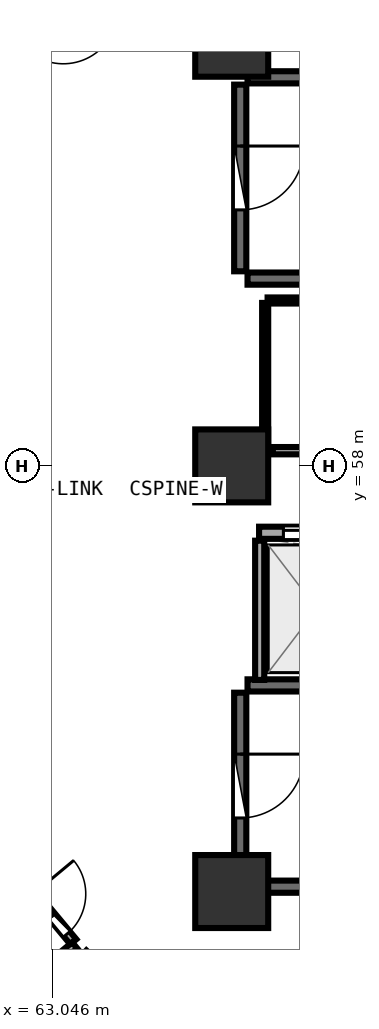
"""IFC4 building model, lengths in metres.
Left out: names, types, materials, properties, quantities, classifications, styles, units other than length and angle.
Written with IfcOpenShell. Run it as: python <this file> out.ifc"""

import sys

from ifc_helpers import new_model, si_unit, direction, frame, frame_2d, origin, origin_2d, place, context, subcontext, project, spatial, rectangle, extrude, element, fill, save


model = new_model("IFC4")
c1 = context("Model", 3, precision=1e-05, world=origin(), true_north=direction((0.0, 1.0)))
c2 = subcontext(c1, "Body", "Model", "MODEL_VIEW")
j1 = project(units=[si_unit("LENGTHUNIT", "METRE"), si_unit("PLANEANGLEUNIT", "RADIAN")], contexts=[c1])
p1 = place(None, origin())
s1 = spatial("IfcSite", under=j1, at=p1, CompositionType="ELEMENT")
p2 = place(p1, origin())
s2 = spatial("IfcBuilding", under=s1, at=p2, CompositionType="ELEMENT")
p3 = place(p2, frame((0.0, 0.0, 196.95)))
s3 = spatial("IfcBuildingStorey", under=s2, at=p3, CompositionType="ELEMENT", Elevation=196.95)
for number, where, z_axis, x_axis in (
    (1, (66.0, 51.0, 0.0), (0.0, 0.0, 1.0), (1.0, 0.0, 0.0)),
    (2, (66.0, 65.0, 0.0), (0.0, 0.0, 1.0), (1.0, 0.0, 0.0)),
    (3, (66.0, 58.0, 0.0), (0.0, 0.0, 1.0), (1.0, 0.0, 0.0)),
):
    element("IfcColumn", number, at=place(p3, frame(where, z_axis=z_axis, x_axis=x_axis)), inside=s3, PredefinedType="PILASTER", context=c2, shape_type="SweptSolid", body=[
        extrude(rectangle(XDim=1.2, YDim=1.2, at=origin_2d()), origin(), (0.0, 0.0, 1.0), 3.75),
    ])
for number, where, z_axis, x_axis in (
    (4, (66.26, 61.08, 0.0), (0.0, 0.0, 1.0), (1.0, 0.0, 0.0)),
    (5, (73.42, 64.39, 0.0), (0.0, 0.0, 1.0), (-1.0, 0.0, 0.0)),
):
    element("IfcWall", number, at=place(p3, frame(where, z_axis=z_axis, x_axis=x_axis)), inside=s3, PredefinedType="SHEAR", context=c2, shape_type="SweptSolid", body=[
        extrude(rectangle(XDim=7.16, YDim=0.2, at=frame_2d((3.58, 0.0))), origin(), (0.0, 0.0, 1.0), 3.49),
    ])
p4 = place(p3, frame((66.14, 64.27, 0.0), z_axis=(0.0, 0.0, 1.0), x_axis=(0.0, -1.0, 0.0)))
e6 = element("IfcWall", 6, at=p4, inside=s3, PredefinedType="SHEAR", context=c2, shape_type="SweptSolid", body=[
    extrude(rectangle(XDim=3.07, YDim=0.2, at=frame_2d((1.535, 0.0))), origin(), (0.0, 0.0, 1.0), 3.49),
])
p5 = place(p4, frame((1.01, 0.0, 0.0)))
e7 = element("IfcOpeningElement", 7, at=p5, cuts=e6, PredefinedType="OPENING", context=c2, shape_type="SweptSolid", body=[
    extrude(rectangle(XDim=1.05, YDim=2.1, at=frame_2d((0.525, 1.05))), frame((0.0, 0.11, 0.0), z_axis=(0.0, -1.0, 0.0), x_axis=(1.0, 0.0, 0.0)), (0.0, 0.0, 1.0), 0.22),
])
for number, where, z_axis, x_axis in (
    (8, (66.26, 51.08, 0.0), (0.0, 0.0, 1.0), (1.0, 0.0, 0.0)),
    (9, (73.42, 54.39, 0.0), (0.0, 0.0, 1.0), (-1.0, 0.0, 0.0)),
):
    element("IfcWall", number, at=place(p3, frame(where, z_axis=z_axis, x_axis=x_axis)), inside=s3, PredefinedType="SHEAR", context=c2, shape_type="SweptSolid", body=[
        extrude(rectangle(XDim=7.16, YDim=0.2, at=frame_2d((3.58, 0.0))), origin(), (0.0, 0.0, 1.0), 3.49),
    ])
p6 = place(p3, frame((66.14, 54.27, 0.0), z_axis=(0.0, 0.0, 1.0), x_axis=(0.0, -1.0, 0.0)))
e10 = element("IfcWall", 10, at=p6, inside=s3, PredefinedType="SHEAR", context=c2, shape_type="SweptSolid", body=[
    extrude(rectangle(XDim=3.07, YDim=0.2, at=frame_2d((1.535, 0.0))), origin(), (0.0, 0.0, 1.0), 3.49),
])
p7 = place(p6, frame((1.01, 0.0, 0.0)))
e11 = element("IfcOpeningElement", 11, at=p7, cuts=e10, PredefinedType="OPENING", context=c2, shape_type="SweptSolid", body=[
    extrude(rectangle(XDim=1.05, YDim=2.1, at=frame_2d((0.525, 1.05))), frame((0.0, 0.11, 0.0), z_axis=(0.0, -1.0, 0.0), x_axis=(1.0, 0.0, 0.0)), (0.0, 0.0, 1.0), 0.22),
])
p8 = place(p3, frame((66.45, 56.9, 0.0), z_axis=(0.0, 0.0, 1.0), x_axis=(1.0, 0.0, 0.0)))
e12 = element("IfcWall", 12, at=p8, inside=s3, PredefinedType="SOLIDWALL", context=c2, shape_type="SweptSolid", body=[
    extrude(rectangle(XDim=14.4, YDim=0.2, at=frame_2d((7.2, 0.0))), origin(), (0.0, 0.0, 1.0), 3.48),
])
p9 = place(p8, frame((0.4, 0.0, 0.0)))
e13 = element("IfcOpeningElement", 13, at=p9, cuts=e12, PredefinedType="OPENING", context=c2, shape_type="SweptSolid", body=[
    extrude(rectangle(XDim=1.1, YDim=2.1, at=frame_2d((0.55, 1.05))), frame((0.0, 0.11, 0.0), z_axis=(0.0, -1.0, 0.0), x_axis=(1.0, 0.0, 0.0)), (0.0, 0.0, 1.0), 0.22),
])
p10 = place(p8, frame((2.4, 0.0, 0.0)))
e14 = element("IfcOpeningElement", 14, at=p10, cuts=e12, PredefinedType="OPENING", context=c2, shape_type="SweptSolid", body=[
    extrude(rectangle(XDim=1.1, YDim=2.1, at=frame_2d((0.55, 1.05))), frame((0.0, 0.11, 0.0), z_axis=(0.0, -1.0, 0.0), x_axis=(1.0, 0.0, 0.0)), (0.0, 0.0, 1.0), 0.22),
])
p11 = place(p8, frame((4.4, 0.0, 0.0)))
e15 = element("IfcOpeningElement", 15, at=p11, cuts=e12, PredefinedType="OPENING", context=c2, shape_type="SweptSolid", body=[
    extrude(rectangle(XDim=1.1, YDim=2.1, at=frame_2d((0.55, 1.05))), frame((0.0, 0.11, 0.0), z_axis=(0.0, -1.0, 0.0), x_axis=(1.0, 0.0, 0.0)), (0.0, 0.0, 1.0), 0.22),
])
p12 = place(p3, frame((66.46, 54.48, 0.0), z_axis=(0.0, 0.0, 1.0), x_axis=(0.0, 1.0, 0.0)))
e16 = element("IfcWall", 16, at=p12, inside=s3, PredefinedType="PARTITIONING", context=c2, shape_type="SweptSolid", body=[
    extrude(rectangle(XDim=2.29, YDim=0.15, at=frame_2d((1.145, 0.0))), origin(), (0.0, 0.0, 1.0), 3.48),
])
p13 = place(p3, frame((66.675, 58.25, 0.0), z_axis=(0.0, 0.0, 1.0), x_axis=(1.0, 0.0, 0.0)))
e17 = element("IfcWall", 17, at=p13, inside=s3, PredefinedType="PARTITIONING", context=c2, shape_type="SweptSolid", body=[
    extrude(rectangle(XDim=3.265, YDim=0.12, at=frame_2d((1.632, 0.0))), origin(), (0.0, 0.0, 1.0), 3.48),
])
p14 = place(p13, frame((1.182, 0.0, 0.0)))
e18 = element("IfcOpeningElement", 18, at=p14, cuts=e17, PredefinedType="OPENING", context=c2, shape_type="SweptSolid", body=[
    extrude(rectangle(XDim=0.9, YDim=2.08, at=frame_2d((0.45, 1.04))), frame((0.0, 0.07, 0.0), z_axis=(0.0, -1.0, 0.0), x_axis=(1.0, 0.0, 0.0)), (0.0, 0.0, 1.0), 0.14),
])
p15 = place(p3, frame((63.885, 66.327, 0.0), z_axis=(0.0, 0.0, 1.0), x_axis=(-0.626276824741, -0.779600756023, 0.0)))
e19 = element("IfcWall", 19, at=p15, inside=s3, PredefinedType="PARTITIONING", context=c2, shape_type="SweptSolid", body=[
    extrude(rectangle(XDim=2.99, YDim=0.12, at=frame_2d((1.495, 0.0))), origin(), (0.0, 0.0, 1.0), 3.025),
])
p16 = place(p15, frame((1.045, 0.0, 0.0)))
e20 = element("IfcOpeningElement", 20, at=p16, cuts=e19, PredefinedType="OPENING", context=c2, shape_type="SweptSolid", body=[
    extrude(rectangle(XDim=0.9, YDim=2.08, at=frame_2d((0.45, 1.04))), frame((0.0, 0.07, 0.0), z_axis=(0.0, -1.0, 0.0), x_axis=(1.0, 0.0, 0.0)), (0.0, 0.0, 1.0), 0.14),
])
p17 = place(p3, frame((62.635, 51.086, 0.0), z_axis=(0.0, 0.0, 1.0), x_axis=(0.639759255057, -0.768575367526, 0.0)))
e21 = element("IfcWall", 21, at=p17, inside=s3, PredefinedType="PLUMBINGWALL", context=c2, shape_type="SweptSolid", body=[
    extrude(rectangle(XDim=1.187, YDim=0.13, at=frame_2d((0.593, 0.0))), origin(), (0.0, 0.0, 1.0), 3.025),
])
p18 = place(p17, frame((0.163, 0.0, 0.0)))
e22 = element("IfcOpeningElement", 22, at=p18, cuts=e21, PredefinedType="OPENING", context=c2, shape_type="SweptSolid", body=[
    extrude(rectangle(XDim=0.86, YDim=2.05, at=frame_2d((0.43, 1.025))), frame((0.0, 0.075, 0.0), z_axis=(0.0, -1.0, 0.0), x_axis=(1.0, 0.0, 0.0)), (0.0, 0.0, 1.0), 0.15),
])
p19 = place(p3, frame((69.96, 60.72, 0.0), z_axis=(0.0, 0.0, 1.0), x_axis=(-1.0, 0.0, 0.0)))
e23 = element("IfcWall", 23, at=p19, inside=s3, PredefinedType="PARTITIONING", context=c2, shape_type="SweptSolid", body=[
    extrude(rectangle(XDim=3.37, YDim=0.1, at=frame_2d((1.685, 0.0))), origin(), (0.0, 0.0, 1.0), 3.48),
])
p20 = place(p3, frame((66.55, 60.68, 0.0), z_axis=(0.0, 0.0, 1.0), x_axis=(0.0, -1.0, 0.0)))
e24 = element("IfcWall", 24, at=p20, inside=s3, PredefinedType="PARTITIONING", context=c2, shape_type="SweptSolid", body=[
    extrude(rectangle(XDim=2.383, YDim=0.1, at=frame_2d((1.191, 0.0))), origin(), (0.0, 0.0, 1.0), 3.48),
])
p21 = place(p3, frame((63.417, 50.115, 0.0), z_axis=(0.0, 0.0, 1.0), x_axis=(-0.76963081868, -0.638489156477, 0.0)))
e25 = element("IfcWall", 25, at=p21, inside=s3, PredefinedType="PLUMBINGWALL", context=c2, shape_type="SweptSolid", body=[
    extrude(rectangle(XDim=3.36, YDim=0.13, at=frame_2d((1.68, 0.0))), origin(), (0.0, 0.0, 1.0), 3.175),
])
p22 = place(p5, origin())
e26 = element("IfcDoor", 26, at=p22, inside=s3, OperationType="SINGLE_SWING_LEFT", PredefinedType="DOOR", context=c2, shape_type="SweptSolid", body=[
    extrude(rectangle(XDim=1.05, YDim=2.1, at=frame_2d((0.525, 1.05))), frame((0.0, 0.025, 0.0), z_axis=(0.0, -1.0, 0.0), x_axis=(1.0, 0.0, 0.0)), (0.0, 0.0, 1.0), 0.05),
])
fill(e7, e26)
p23 = place(p7, origin())
e27 = element("IfcDoor", 27, at=p23, inside=s3, OperationType="SINGLE_SWING_LEFT", PredefinedType="DOOR", context=c2, shape_type="SweptSolid", body=[
    extrude(rectangle(XDim=1.05, YDim=2.1, at=frame_2d((0.525, 1.05))), frame((0.0, 0.025, 0.0), z_axis=(0.0, -1.0, 0.0), x_axis=(1.0, 0.0, 0.0)), (0.0, 0.0, 1.0), 0.05),
])
fill(e11, e27)
p24 = place(p9, origin())
e28 = element("IfcDoor", 28, at=p24, inside=s3, OperationType="DOUBLE_DOOR_SLIDING", PredefinedType="DOOR", context=c2, shape_type="SweptSolid", body=[
    extrude(rectangle(XDim=1.1, YDim=2.1, at=frame_2d((0.55, 1.05))), frame((0.0, 0.025, 0.0), z_axis=(0.0, -1.0, 0.0), x_axis=(1.0, 0.0, 0.0)), (0.0, 0.0, 1.0), 0.05),
])
fill(e13, e28)
p25 = place(p16, origin())
e29 = element("IfcDoor", 29, at=p25, inside=s3, OperationType="SINGLE_SWING_LEFT", PredefinedType="DOOR", context=c2, shape_type="SweptSolid", body=[
    extrude(rectangle(XDim=0.9, YDim=2.08, at=frame_2d((0.45, 1.04))), frame((0.0, 0.025, 0.0), z_axis=(0.0, -1.0, 0.0), x_axis=(1.0, 0.0, 0.0)), (0.0, 0.0, 1.0), 0.05),
])
fill(e20, e29)
p26 = place(p18, origin())
e30 = element("IfcDoor", 30, at=p26, inside=s3, OperationType="SINGLE_SWING_LEFT", PredefinedType="DOOR", context=c2, shape_type="SweptSolid", body=[
    extrude(rectangle(XDim=0.86, YDim=2.05, at=frame_2d((0.43, 1.025))), frame((0.0, 0.025, 0.0), z_axis=(0.0, -1.0, 0.0), x_axis=(1.0, 0.0, 0.0)), (0.0, 0.0, 1.0), 0.05),
])
fill(e22, e30)
save(model, sys.argv[1])
